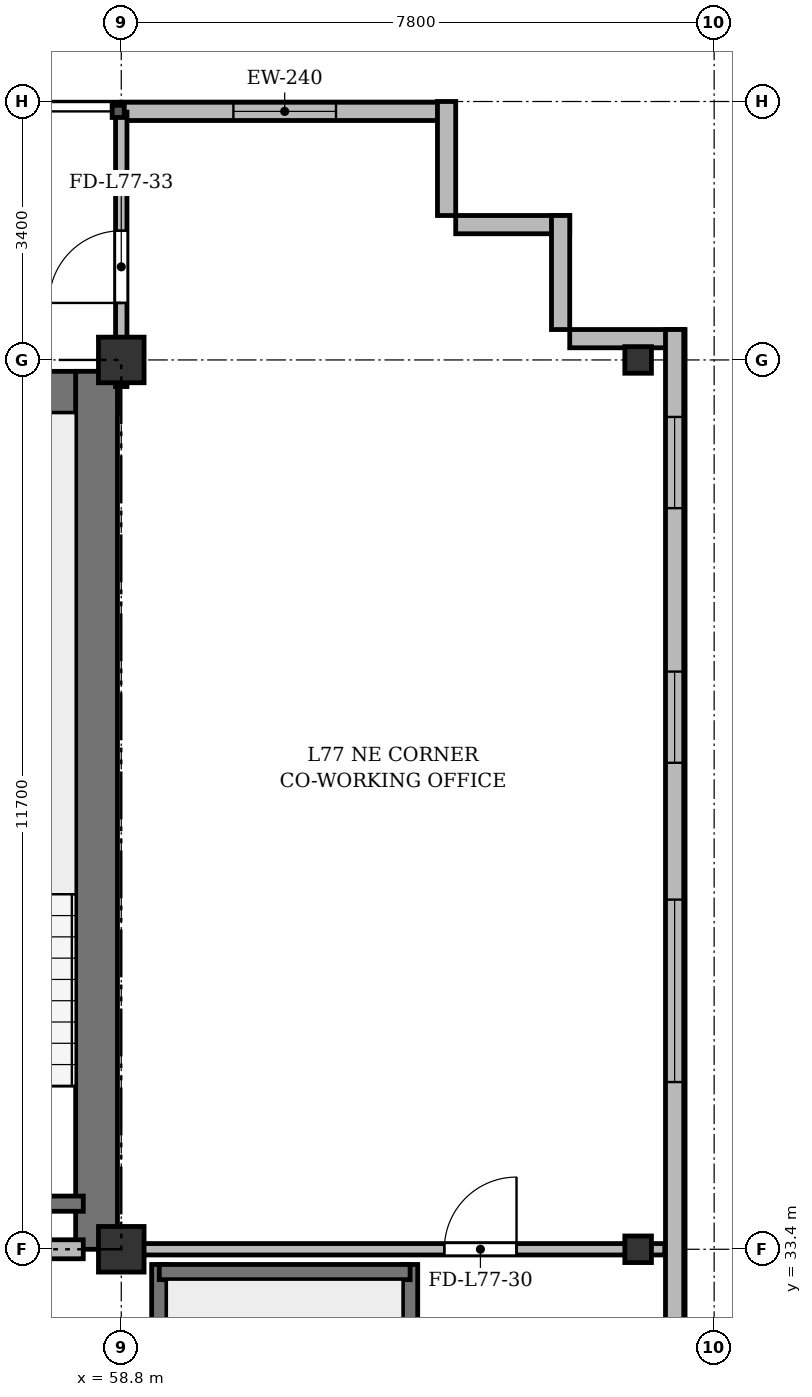
"""IFC4 building model, lengths in metres.
Left out: names, types, materials, properties, quantities, classifications, styles, units other than length and angle.
Written with IfcOpenShell. Run it as: python <this file> out.ifc"""

import sys

from ifc_helpers import new_model, si_unit, direction, frame, frame_2d, origin, origin_2d, place, context, subcontext, project, spatial, rectangle, i_section, extrude, source, transform, mapped, element, fill, save


model = new_model("IFC4")
c1 = context("Model", 3, precision=1e-05, world=origin(), true_north=direction((0.0, 1.0)))
c2 = subcontext(c1, "Body", "Model", "MODEL_VIEW")
j1 = project(units=[si_unit("LENGTHUNIT", "METRE"), si_unit("PLANEANGLEUNIT", "RADIAN")], contexts=[c1])
p1 = place(None, origin())
s1 = spatial("IfcSite", under=j1, at=p1, CompositionType="ELEMENT")
p2 = place(p1, origin())
s2 = spatial("IfcBuilding", under=s1, at=p2, CompositionType="ELEMENT")
p3 = place(p2, frame((0.0, 0.0, 295.5)))
s3 = spatial("IfcBuildingStorey", under=s2, at=p3, CompositionType="ELEMENT", Elevation=295.5)
m1 = source(origin(), c2, "Body", "SweptSolid", [
    extrude(rectangle(XDim=0.6, YDim=0.6, at=origin_2d()), origin(), (0.0, 0.0, 1.0), 3.6),
])
for number, where, z_axis, x_axis in (
    (1, (58.8, 33.4, 0.0), (0.0, 0.0, 1.0), (1.0, 0.0, 0.0)),
    (2, (58.8, 45.1, 0.0), (0.0, 0.0, 1.0), (1.0, 0.0, 0.0)),
):
    element("IfcColumn", number, at=place(p3, frame(where, z_axis=z_axis, x_axis=x_axis)), inside=s3, PredefinedType="COLUMN", context=c2, shape_type="MappedRepresentation", body=[
        mapped(m1, transform((0.0, 0.0, 0.0), x_axis=(1.0, 0.0, 0.0), y_axis=(0.0, 1.0, 0.0), z_axis=(0.0, 0.0, 1.0), scale=1.0)),
    ])
m2 = source(origin(), c2, "Body", "SweptSolid", [
    extrude(i_section(OverallWidth=0.35, OverallDepth=0.35, WebThickness=0.018, FlangeThickness=0.028, at=origin_2d()), origin(), (0.0, 0.0, 1.0), 3.6),
])
for number, where, z_axis, x_axis in (
    (3, (65.6, 33.4, 0.0), (0.0, 0.0, 1.0), (1.0, 0.0, 0.0)),
    (4, (65.6, 45.1, 0.0), (0.0, 0.0, 1.0), (1.0, 0.0, 0.0)),
):
    element("IfcColumn", number, at=place(p3, frame(where, z_axis=z_axis, x_axis=x_axis)), inside=s3, PredefinedType="COLUMN", context=c2, shape_type="MappedRepresentation", body=[
        mapped(m2, transform((0.0, 0.0, 0.0), x_axis=(1.0, 0.0, 0.0), y_axis=(0.0, 1.0, 0.0), z_axis=(0.0, 0.0, 1.0), scale=1.0)),
    ])
p4 = place(p3, frame((58.8, 48.37, 0.0), z_axis=(0.0, 0.0, 1.0), x_axis=(1.0, 0.0, 0.0)))
e5 = element("IfcWall", 5, at=p4, inside=s3, PredefinedType="SOLIDWALL", context=c2, shape_type="SweptSolid", body=[
    extrude(rectangle(XDim=4.3, YDim=0.24, at=frame_2d((2.15, 0.0))), origin(), (0.0, 0.0, 1.0), 3.26),
])
p5 = place(p4, frame((1.475, 0.0, 0.9)))
e6 = element("IfcOpeningElement", 6, at=p5, cuts=e5, PredefinedType="OPENING", context=c2, shape_type="SweptSolid", body=[
    extrude(rectangle(XDim=1.35, YDim=1.5, at=frame_2d((0.675, 0.75))), frame((0.0, 0.13, 0.0), z_axis=(0.0, -1.0, 0.0), x_axis=(1.0, 0.0, 0.0)), (0.0, 0.0, 1.0), 0.26),
])
for number, where, z_axis, x_axis in (
    (7, (63.08, 48.5, 0.0), (0.0, 0.0, 1.0), (0.0, -1.0, 0.0)),
    (8, (63.2, 46.88, 0.0), (0.0, 0.0, 1.0), (1.0, 0.0, 0.0)),
    (9, (64.58, 47.0, 0.0), (0.0, 0.0, 1.0), (0.0, -1.0, 0.0)),
    (10, (64.7, 45.38, 0.0), (0.0, 0.0, 1.0), (1.0, 0.0, 0.0)),
):
    element("IfcWall", number, at=place(p3, frame(where, z_axis=z_axis, x_axis=x_axis)), inside=s3, PredefinedType="SOLIDWALL", context=c2, shape_type="SweptSolid", body=[
        extrude(rectangle(XDim=1.5, YDim=0.24, at=frame_2d((0.75, 0.0))), origin(), (0.0, 0.0, 1.0), 3.26),
    ])
p6 = place(p3, frame((66.08, 45.5, 0.0), z_axis=(0.0, 0.0, 1.0), x_axis=(0.0, -1.0, 0.0)))
e11 = element("IfcWall", 11, at=p6, inside=s3, PredefinedType="SOLIDWALL", context=c2, shape_type="SweptSolid", body=[
    extrude(rectangle(XDim=39.0, YDim=0.24, at=frame_2d((19.5, 0.0))), origin(), (0.0, 0.0, 1.0), 3.26),
])
p7 = place(p6, frame((36.35, 0.0, 0.92)))
e12 = element("IfcOpeningElement", 12, at=p7, cuts=e11, PredefinedType="OPENING", context=c2, shape_type="SweptSolid", body=[
    extrude(rectangle(XDim=1.2, YDim=1.65, at=frame_2d((0.6, 0.825))), frame((0.0, 0.13, 0.0), z_axis=(0.0, -1.0, 0.0), x_axis=(1.0, 0.0, 0.0)), (0.0, 0.0, 1.0), 0.26),
])
p8 = place(p6, frame((32.9, 0.0, 0.92)))
e13 = element("IfcOpeningElement", 13, at=p8, cuts=e11, PredefinedType="OPENING", context=c2, shape_type="SweptSolid", body=[
    extrude(rectangle(XDim=2.4, YDim=2.1, at=frame_2d((1.2, 1.05))), frame((0.0, 0.13, 0.0), z_axis=(0.0, -1.0, 0.0), x_axis=(1.0, 0.0, 0.0)), (0.0, 0.0, 1.0), 0.26),
])
p9 = place(p6, frame((7.5, 0.0, 0.92)))
e14 = element("IfcOpeningElement", 14, at=p9, cuts=e11, PredefinedType="OPENING", context=c2, shape_type="SweptSolid", body=[
    extrude(rectangle(XDim=2.4, YDim=2.1, at=frame_2d((1.2, 1.05))), frame((0.0, 0.13, 0.0), z_axis=(0.0, -1.0, 0.0), x_axis=(1.0, 0.0, 0.0)), (0.0, 0.0, 1.0), 0.26),
])
p10 = place(p6, frame((4.5, 0.0, 0.92)))
e15 = element("IfcOpeningElement", 15, at=p10, cuts=e11, PredefinedType="OPENING", context=c2, shape_type="SweptSolid", body=[
    extrude(rectangle(XDim=1.2, YDim=1.65, at=frame_2d((0.6, 0.825))), frame((0.0, 0.13, 0.0), z_axis=(0.0, -1.0, 0.0), x_axis=(1.0, 0.0, 0.0)), (0.0, 0.0, 1.0), 0.26),
])
p11 = place(p6, frame((1.15, 0.0, 0.92)))
e16 = element("IfcOpeningElement", 16, at=p11, cuts=e11, PredefinedType="OPENING", context=c2, shape_type="SweptSolid", body=[
    extrude(rectangle(XDim=1.2, YDim=1.65, at=frame_2d((0.6, 0.825))), frame((0.0, 0.13, 0.0), z_axis=(0.0, -1.0, 0.0), x_axis=(1.0, 0.0, 0.0)), (0.0, 0.0, 1.0), 0.26),
])
p12 = place(p3, frame((15.65, 44.675, 0.0), z_axis=(0.0, 0.0, 1.0), x_axis=(1.0, 0.0, 0.0)))
e17 = element("IfcWall", 17, at=p12, inside=s3, PredefinedType="SHEAR", context=c2, shape_type="SweptSolid", body=[
    extrude(rectangle(XDim=43.1, YDim=0.55, at=frame_2d((21.55, 0.0))), origin(), (0.0, 0.0, 1.0), 3.26),
])
p13 = place(p3, frame((58.475, 33.4, 0.0), z_axis=(0.0, 0.0, 1.0), x_axis=(0.0, 1.0, 0.0)))
e18 = element("IfcWall", 18, at=p13, inside=s3, PredefinedType="SHEAR", context=c2, shape_type="SweptSolid", body=[
    extrude(rectangle(XDim=11.55, YDim=0.55, at=frame_2d((5.775, 0.0))), origin(), (0.0, 0.0, 1.0), 3.26),
])
p14 = place(p3, frame((54.9, 34.0, 0.0), z_axis=(0.0, 0.0, 1.0), x_axis=(1.0, 0.0, 0.0)))
e19 = element("IfcWall", 19, at=p14, inside=s3, PredefinedType="SHEAR", context=c2, shape_type="SweptSolid", body=[
    extrude(rectangle(XDim=3.4, YDim=0.2, at=frame_2d((1.7, 0.0))), origin(), (0.0, 0.0, 1.0), 3.26),
])
for number, where, z_axis, x_axis in (
    (20, (59.3, 23.2, 0.0), (0.0, 0.0, 1.0), (0.0, 1.0, 0.0)),
    (21, (62.6, 23.2, 0.0), (0.0, 0.0, 1.0), (0.0, 1.0, 0.0)),
):
    element("IfcWall", number, at=place(p3, frame(where, z_axis=z_axis, x_axis=x_axis)), inside=s3, PredefinedType="SHEAR", context=c2, shape_type="SweptSolid", body=[
        extrude(rectangle(XDim=10.0, YDim=0.2, at=frame_2d((5.0, 0.0))), origin(), (0.0, 0.0, 1.0), 3.26),
    ])
p15 = place(p3, frame((59.3, 33.1, 0.0), z_axis=(0.0, 0.0, 1.0), x_axis=(1.0, 0.0, 0.0)))
e22 = element("IfcWall", 22, at=p15, inside=s3, PredefinedType="SHEAR", context=c2, shape_type="SweptSolid", body=[
    extrude(rectangle(XDim=3.3, YDim=0.2, at=frame_2d((1.65, 0.0))), origin(), (0.0, 0.0, 1.0), 3.26),
])
p16 = place(p3, frame((47.15, 33.4, 0.0), z_axis=(0.0, 0.0, 1.0), x_axis=(1.0, 0.0, 0.0)))
e23 = element("IfcWall", 23, at=p16, inside=s3, PredefinedType="PARTITIONING", context=c2, shape_type="SweptSolid", body=[
    extrude(rectangle(XDim=11.15, YDim=0.25, at=frame_2d((5.575, 0.0))), origin(), (0.0, 0.0, 1.0), 2.81),
])
p17 = place(p16, frame((0.7, 0.0, 0.0)))
e24 = element("IfcOpeningElement", 24, at=p17, cuts=e23, PredefinedType="OPENING", context=c2, shape_type="SweptSolid", body=[
    extrude(rectangle(XDim=0.95, YDim=2.15, at=frame_2d((0.475, 1.075))), frame((0.0, 0.135, 0.0), z_axis=(0.0, -1.0, 0.0), x_axis=(1.0, 0.0, 0.0)), (0.0, 0.0, 1.0), 0.27),
])
p18 = place(p16, frame((6.0, 0.0, 0.0)))
e25 = element("IfcOpeningElement", 25, at=p18, cuts=e23, PredefinedType="OPENING", context=c2, shape_type="SweptSolid", body=[
    extrude(rectangle(XDim=1.2, YDim=2.15, at=frame_2d((0.6, 1.075))), frame((0.0, 0.135, 0.0), z_axis=(0.0, -1.0, 0.0), x_axis=(1.0, 0.0, 0.0)), (0.0, 0.0, 1.0), 0.27),
])
p19 = place(p3, frame((58.8, 33.4, 0.0), z_axis=(0.0, 0.0, 1.0), x_axis=(1.0, 0.0, 0.0)))
e26 = element("IfcWall", 26, at=p19, inside=s3, PredefinedType="PARTITIONING", context=c2, shape_type="SweptSolid", body=[
    extrude(rectangle(XDim=7.15, YDim=0.15, at=frame_2d((3.575, 0.0))), origin(), (0.0, 0.0, 1.0), 2.81),
])
p20 = place(p19, frame((4.25, 0.0, 0.0)))
e27 = element("IfcOpeningElement", 27, at=p20, cuts=e26, PredefinedType="OPENING", context=c2, shape_type="SweptSolid", body=[
    extrude(rectangle(XDim=0.95, YDim=2.15, at=frame_2d((0.475, 1.075))), frame((0.0, 0.085, 0.0), z_axis=(0.0, -1.0, 0.0), x_axis=(1.0, 0.0, 0.0)), (0.0, 0.0, 1.0), 0.17),
])
p21 = place(p3, frame((58.8, 44.75, 0.0), z_axis=(0.0, 0.0, 1.0), x_axis=(0.0, 1.0, 0.0)))
e28 = element("IfcWall", 28, at=p21, inside=s3, PredefinedType="PARTITIONING", context=c2, shape_type="SweptSolid", body=[
    extrude(rectangle(XDim=3.61, YDim=0.15, at=frame_2d((1.805, 0.0))), origin(), (0.0, 0.0, 1.0), 2.76),
])
p22 = place(p21, frame((1.1, 0.0, 0.0)))
e29 = element("IfcOpeningElement", 29, at=p22, cuts=e28, PredefinedType="OPENING", context=c2, shape_type="SweptSolid", body=[
    extrude(rectangle(XDim=0.95, YDim=2.15, at=frame_2d((0.475, 1.075))), frame((0.0, 0.085, 0.0), z_axis=(0.0, -1.0, 0.0), x_axis=(1.0, 0.0, 0.0)), (0.0, 0.0, 1.0), 0.17),
])
m3 = source(origin(), c2, "Body", "SweptSolid", [
    extrude(rectangle(XDim=1.35, YDim=1.5, at=frame_2d((0.675, 0.75))), frame((0.0, 0.03, 0.0), z_axis=(0.0, -1.0, 0.0), x_axis=(1.0, 0.0, 0.0)), (0.0, 0.0, 1.0), 0.06),
])
p23 = place(p5, origin())
e30 = element("IfcWindow", 30, at=p23, inside=s3, PartitioningType="SINGLE_PANEL", PredefinedType="WINDOW", context=c2, shape_type="MappedRepresentation", body=[
    mapped(m3, transform((0.0, 0.0, 0.0), x_axis=(1.0, 0.0, 0.0), y_axis=(0.0, 1.0, 0.0), z_axis=(0.0, 0.0, 1.0), scale=1.0)),
])
fill(e6, e30)
m4 = source(origin(), c2, "Body", "SweptSolid", [
    extrude(rectangle(XDim=2.4, YDim=2.1, at=frame_2d((1.2, 1.05))), frame((0.0, 0.03, 0.0), z_axis=(0.0, -1.0, 0.0), x_axis=(1.0, 0.0, 0.0)), (0.0, 0.0, 1.0), 0.06),
])
p24 = place(p9, origin())
e31 = element("IfcWindow", 31, at=p24, inside=s3, PartitioningType="SINGLE_PANEL", PredefinedType="WINDOW", context=c2, shape_type="MappedRepresentation", body=[
    mapped(m4, transform((0.0, 0.0, 0.0), x_axis=(1.0, 0.0, 0.0), y_axis=(0.0, 1.0, 0.0), z_axis=(0.0, 0.0, 1.0), scale=1.0)),
])
fill(e14, e31)
m5 = source(origin(), c2, "Body", "SweptSolid", [
    extrude(rectangle(XDim=1.2, YDim=1.65, at=frame_2d((0.6, 0.825))), frame((0.0, 0.03, 0.0), z_axis=(0.0, -1.0, 0.0), x_axis=(1.0, 0.0, 0.0)), (0.0, 0.0, 1.0), 0.06),
])
p25 = place(p10, origin())
e32 = element("IfcWindow", 32, at=p25, inside=s3, PartitioningType="SINGLE_PANEL", PredefinedType="WINDOW", context=c2, shape_type="MappedRepresentation", body=[
    mapped(m5, transform((0.0, 0.0, 0.0), x_axis=(1.0, 0.0, 0.0), y_axis=(0.0, 1.0, 0.0), z_axis=(0.0, 0.0, 1.0), scale=1.0)),
])
fill(e15, e32)
p26 = place(p11, origin())
e33 = element("IfcWindow", 33, at=p26, inside=s3, PartitioningType="SINGLE_PANEL", PredefinedType="WINDOW", context=c2, shape_type="MappedRepresentation", body=[
    mapped(m5, transform((0.0, 0.0, 0.0), x_axis=(1.0, 0.0, 0.0), y_axis=(0.0, 1.0, 0.0), z_axis=(0.0, 0.0, 1.0), scale=1.0)),
])
fill(e16, e33)
m6 = source(origin(), c2, "Body", "SweptSolid", [
    extrude(rectangle(XDim=0.95, YDim=2.15, at=frame_2d((0.475, 1.075))), frame((0.0, 0.025, 0.0), z_axis=(0.0, -1.0, 0.0), x_axis=(1.0, 0.0, 0.0)), (0.0, 0.0, 1.0), 0.05),
])
p27 = place(p20, origin())
e34 = element("IfcDoor", 34, at=p27, inside=s3, OperationType="SINGLE_SWING_RIGHT", PredefinedType="DOOR", context=c2, shape_type="MappedRepresentation", body=[
    mapped(m6, transform((0.0, 0.0, 0.0), x_axis=(1.0, 0.0, 0.0), y_axis=(0.0, 1.0, 0.0), z_axis=(0.0, 0.0, 1.0), scale=1.0)),
])
fill(e27, e34)
p28 = place(p22, origin())
e35 = element("IfcDoor", 35, at=p28, inside=s3, OperationType="SINGLE_SWING_LEFT", PredefinedType="DOOR", context=c2, shape_type="MappedRepresentation", body=[
    mapped(m6, transform((0.0, 0.0, 0.0), x_axis=(1.0, 0.0, 0.0), y_axis=(0.0, 1.0, 0.0), z_axis=(0.0, 0.0, 1.0), scale=1.0)),
])
fill(e29, e35)
save(model, sys.argv[1])
